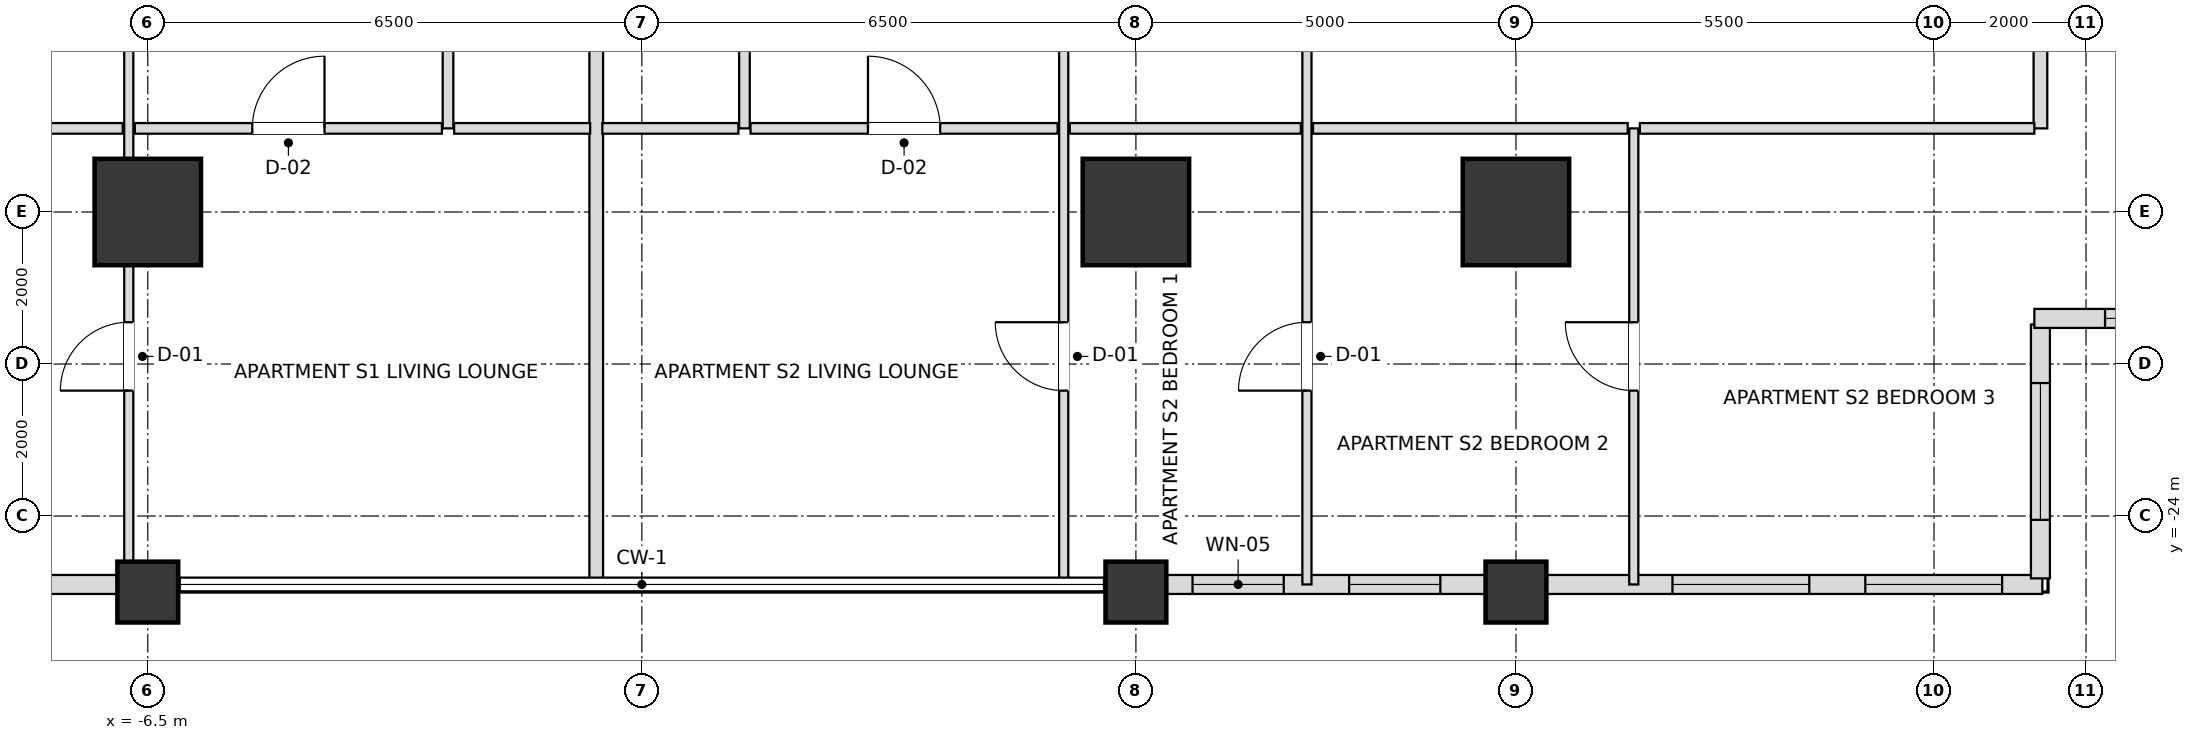
"""IFC4 building model, lengths in metres.
Left out: names, types, materials, properties, quantities, classifications, styles, units other than length and angle.
Written with IfcOpenShell. Run it as: python <this file> out.ifc"""

import sys

from ifc_helpers import new_model, si_unit, direction, frame, frame_2d, origin, origin_2d, place, context, subcontext, project, spatial, rectangle, extrude, element, fill, save


model = new_model("IFC4")
c1 = context("Model", 3, precision=1e-05, world=origin(), true_north=direction((0.0, 1.0)))
c2 = subcontext(c1, "Body", "Model", "MODEL_VIEW")
j1 = project(units=[si_unit("LENGTHUNIT", "METRE"), si_unit("PLANEANGLEUNIT", "RADIAN")], contexts=[c1])
p1 = place(None, origin())
s1 = spatial("IfcSite", under=j1, at=p1, CompositionType="ELEMENT")
p2 = place(p1, origin())
s2 = spatial("IfcBuilding", under=s1, at=p2, CompositionType="ELEMENT")
p3 = place(p2, frame((0.0, 0.0, 75.6)))
s3 = spatial("IfcBuildingStorey", under=s2, at=p3, CompositionType="ELEMENT", Elevation=75.6)
for number, where, z_axis, x_axis in (
    (1, (-6.5, -20.0, 0.0), (0.0, 0.0, 1.0), (1.0, 0.0, 0.0)),
    (2, (6.5, -20.0, 0.0), (0.0, 0.0, 1.0), (1.0, 0.0, 0.0)),
    (3, (11.5, -20.0, 0.0), (0.0, 0.0, 1.0), (1.0, 0.0, 0.0)),
):
    element("IfcColumn", number, at=place(p3, frame(where, z_axis=z_axis, x_axis=x_axis)), inside=s3, PredefinedType="USERDEFINED", context=c2, shape_type="SweptSolid", body=[
        extrude(rectangle(XDim=1.4, YDim=1.4, at=origin_2d()), origin(), (0.0, 0.0, 1.0), 3.6),
    ])
for number, where, z_axis, x_axis in (
    (4, (-6.5, -25.0, 0.0), (0.0, 0.0, 1.0), (1.0, 0.0, 0.0)),
    (5, (6.5, -25.0, 0.0), (0.0, 0.0, 1.0), (1.0, 0.0, 0.0)),
    (6, (11.5, -25.0, 0.0), (0.0, 0.0, 1.0), (1.0, 0.0, 0.0)),
):
    element("IfcColumn", number, at=place(p3, frame(where, z_axis=z_axis, x_axis=x_axis)), inside=s3, PredefinedType="COLUMN", context=c2, shape_type="SweptSolid", body=[
        extrude(rectangle(XDim=0.8, YDim=0.8, at=origin_2d()), origin(), (0.0, 0.0, 1.0), 3.6),
    ])
p4 = place(p3, frame((-11.105, -24.9, 0.0), z_axis=(0.0, 0.0, 1.0), x_axis=(1.0, 0.0, 0.0)))
e7 = element("IfcWall", 7, at=p4, inside=s3, PredefinedType="SOLIDWALL", context=c2, shape_type="SweptSolid", body=[
    extrude(rectangle(XDim=4.21, YDim=0.25, at=frame_2d((2.105, 0.0))), origin(), (0.0, 0.0, 1.0), 2.736),
])
p5 = place(p4, frame((1.205, 0.0, 0.72)))
e8 = element("IfcOpeningElement", 8, at=p5, cuts=e7, PredefinedType="OPENING", context=c2, shape_type="SweptSolid", body=[
    extrude(rectangle(XDim=1.8, YDim=1.68, at=frame_2d((0.9, 0.84))), frame((0.0, 0.135, 0.0), z_axis=(0.0, -1.0, 0.0), x_axis=(1.0, 0.0, 0.0)), (0.0, 0.0, 1.0), 0.27),
])
p6 = place(p3, frame((6.895, -24.9, 0.0), z_axis=(0.0, 0.0, 1.0), x_axis=(1.0, 0.0, 0.0)))
e9 = element("IfcWall", 9, at=p6, inside=s3, PredefinedType="SOLIDWALL", context=c2, shape_type="SweptSolid", body=[
    extrude(rectangle(XDim=4.21, YDim=0.25, at=frame_2d((2.105, 0.0))), origin(), (0.0, 0.0, 1.0), 2.736),
])
p7 = place(p6, frame((0.35, 0.0, 0.72)))
e10 = element("IfcOpeningElement", 10, at=p7, cuts=e9, PredefinedType="OPENING", context=c2, shape_type="SweptSolid", body=[
    extrude(rectangle(XDim=1.2, YDim=1.68, at=frame_2d((0.6, 0.84))), frame((0.0, 0.135, 0.0), z_axis=(0.0, -1.0, 0.0), x_axis=(1.0, 0.0, 0.0)), (0.0, 0.0, 1.0), 0.27),
])
p8 = place(p6, frame((2.41, 0.0, 0.72)))
e11 = element("IfcOpeningElement", 11, at=p8, cuts=e9, PredefinedType="OPENING", context=c2, shape_type="SweptSolid", body=[
    extrude(rectangle(XDim=1.2, YDim=1.68, at=frame_2d((0.6, 0.84))), frame((0.0, 0.135, 0.0), z_axis=(0.0, -1.0, 0.0), x_axis=(1.0, 0.0, 0.0)), (0.0, 0.0, 1.0), 0.27),
])
p9 = place(p3, frame((11.895, -24.9, 0.0), z_axis=(0.0, 0.0, 1.0), x_axis=(1.0, 0.0, 0.0)))
e12 = element("IfcWall", 12, at=p9, inside=s3, PredefinedType="SOLIDWALL", context=c2, shape_type="SweptSolid", body=[
    extrude(rectangle(XDim=6.53, YDim=0.25, at=frame_2d((3.265, 0.0))), origin(), (0.0, 0.0, 1.0), 2.736),
])
p10 = place(p9, frame((1.664, 0.0, 0.72)))
e13 = element("IfcOpeningElement", 13, at=p10, cuts=e12, PredefinedType="OPENING", context=c2, shape_type="SweptSolid", body=[
    extrude(rectangle(XDim=1.8, YDim=1.68, at=frame_2d((0.9, 0.84))), frame((0.0, 0.135, 0.0), z_axis=(0.0, -1.0, 0.0), x_axis=(1.0, 0.0, 0.0)), (0.0, 0.0, 1.0), 0.27),
])
p11 = place(p9, frame((4.201, 0.0, 0.72)))
e14 = element("IfcOpeningElement", 14, at=p11, cuts=e12, PredefinedType="OPENING", context=c2, shape_type="SweptSolid", body=[
    extrude(rectangle(XDim=1.8, YDim=1.68, at=frame_2d((0.9, 0.84))), frame((0.0, 0.135, 0.0), z_axis=(0.0, -1.0, 0.0), x_axis=(1.0, 0.0, 0.0)), (0.0, 0.0, 1.0), 0.27),
])
p12 = place(p3, frame((18.4, -24.82, 0.0), z_axis=(0.0, 0.0, 1.0), x_axis=(0.0, 1.0, 0.0)))
e15 = element("IfcWall", 15, at=p12, inside=s3, PredefinedType="SOLIDWALL", context=c2, shape_type="SweptSolid", body=[
    extrude(rectangle(XDim=3.34, YDim=0.25, at=frame_2d((1.67, 0.0))), origin(), (0.0, 0.0, 1.0), 2.736),
])
p13 = place(p12, frame((0.77, 0.0, 0.72)))
e16 = element("IfcOpeningElement", 16, at=p13, cuts=e15, PredefinedType="OPENING", context=c2, shape_type="SweptSolid", body=[
    extrude(rectangle(XDim=1.8, YDim=1.68, at=frame_2d((0.9, 0.84))), frame((0.0, 0.135, 0.0), z_axis=(0.0, -1.0, 0.0), x_axis=(1.0, 0.0, 0.0)), (0.0, 0.0, 1.0), 0.27),
])
p14 = place(p3, frame((18.32, -21.4, 0.0), z_axis=(0.0, 0.0, 1.0), x_axis=(1.0, 0.0, 0.0)))
e17 = element("IfcWall", 17, at=p14, inside=s3, PredefinedType="SOLIDWALL", context=c2, shape_type="SweptSolid", body=[
    extrude(rectangle(XDim=3.66, YDim=0.25, at=frame_2d((1.83, 0.0))), origin(), (0.0, 0.0, 1.0), 2.736),
])
p15 = place(p14, frame((0.93, 0.0, 0.72)))
e18 = element("IfcOpeningElement", 18, at=p15, cuts=e17, PredefinedType="OPENING", context=c2, shape_type="SweptSolid", body=[
    extrude(rectangle(XDim=1.8, YDim=1.68, at=frame_2d((0.9, 0.84))), frame((0.0, 0.135, 0.0), z_axis=(0.0, -1.0, 0.0), x_axis=(1.0, 0.0, 0.0)), (0.0, 0.0, 1.0), 0.27),
])
p16 = place(p3, frame((-6.75, -24.9, 0.0), z_axis=(0.0, 0.0, 1.0), x_axis=(0.0, 1.0, 0.0)))
e19 = element("IfcWall", 19, at=p16, inside=s3, PredefinedType="PARTITIONING", context=c2, shape_type="SweptSolid", body=[
    extrude(rectangle(XDim=15.6, YDim=0.12, at=frame_2d((7.8, 0.0))), origin(), (0.0, 0.0, 1.0), 2.816),
])
p17 = place(p16, frame((10.325, 0.0, 0.0)))
e20 = element("IfcOpeningElement", 20, at=p17, cuts=e19, PredefinedType="OPENING", context=c2, shape_type="SweptSolid", body=[
    extrude(rectangle(XDim=0.95, YDim=2.1, at=frame_2d((0.475, 1.05))), frame((0.0, 0.07, 0.0), z_axis=(0.0, -1.0, 0.0), x_axis=(1.0, 0.0, 0.0)), (0.0, 0.0, 1.0), 0.14),
])
p18 = place(p16, frame((2.55, 0.0, 0.0)))
e21 = element("IfcOpeningElement", 21, at=p18, cuts=e19, PredefinedType="OPENING", context=c2, shape_type="SweptSolid", body=[
    extrude(rectangle(XDim=0.9, YDim=2.1, at=frame_2d((0.45, 1.05))), frame((0.0, 0.07, 0.0), z_axis=(0.0, -1.0, 0.0), x_axis=(1.0, 0.0, 0.0)), (0.0, 0.0, 1.0), 0.14),
])
p19 = place(p3, frame((-2.55, -18.9, 0.0), z_axis=(0.0, 0.0, 1.0), x_axis=(0.0, 1.0, 0.0)))
e22 = element("IfcWall", 22, at=p19, inside=s3, PredefinedType="PARTITIONING", context=c2, shape_type="SweptSolid", body=[
    extrude(rectangle(XDim=9.6, YDim=0.14, at=frame_2d((4.8, 0.0))), origin(), (0.0, 0.0, 1.0), 2.948),
])
p20 = place(p19, frame((4.35, 0.0, 0.0)))
e23 = element("IfcOpeningElement", 23, at=p20, cuts=e22, PredefinedType="OPENING", context=c2, shape_type="SweptSolid", body=[
    extrude(rectangle(XDim=0.9, YDim=2.1, at=frame_2d((0.45, 1.05))), frame((0.0, 0.08, 0.0), z_axis=(0.0, -1.0, 0.0), x_axis=(1.0, 0.0, 0.0)), (0.0, 0.0, 1.0), 0.16),
])
p21 = place(p3, frame((-0.6, -24.9, 0.0), z_axis=(0.0, 0.0, 1.0), x_axis=(0.0, 1.0, 0.0)))
e24 = element("IfcWall", 24, at=p21, inside=s3, PredefinedType="PARTITIONING", context=c2, shape_type="SweptSolid", body=[
    extrude(rectangle(XDim=15.6, YDim=0.18, at=frame_2d((7.8, 0.0))), origin(), (0.0, 0.0, 1.0), 2.816),
])
p22 = place(p3, frame((1.35, -18.9, 0.0), z_axis=(0.0, 0.0, 1.0), x_axis=(0.0, 1.0, 0.0)))
e25 = element("IfcWall", 25, at=p22, inside=s3, PredefinedType="PARTITIONING", context=c2, shape_type="SweptSolid", body=[
    extrude(rectangle(XDim=9.6, YDim=0.14, at=frame_2d((4.8, 0.0))), origin(), (0.0, 0.0, 1.0), 2.948),
])
p23 = place(p22, frame((4.35, 0.0, 0.0)))
e26 = element("IfcOpeningElement", 26, at=p23, cuts=e25, PredefinedType="OPENING", context=c2, shape_type="SweptSolid", body=[
    extrude(rectangle(XDim=0.9, YDim=2.1, at=frame_2d((0.45, 1.05))), frame((0.0, 0.08, 0.0), z_axis=(0.0, -1.0, 0.0), x_axis=(1.0, 0.0, 0.0)), (0.0, 0.0, 1.0), 0.16),
])
p24 = place(p3, frame((5.55, -24.9, 0.0), z_axis=(0.0, 0.0, 1.0), x_axis=(0.0, 1.0, 0.0)))
e27 = element("IfcWall", 27, at=p24, inside=s3, PredefinedType="PARTITIONING", context=c2, shape_type="SweptSolid", body=[
    extrude(rectangle(XDim=15.6, YDim=0.12, at=frame_2d((7.8, 0.0))), origin(), (0.0, 0.0, 1.0), 2.816),
])
p25 = place(p24, frame((10.325, 0.0, 0.0)))
e28 = element("IfcOpeningElement", 28, at=p25, cuts=e27, PredefinedType="OPENING", context=c2, shape_type="SweptSolid", body=[
    extrude(rectangle(XDim=0.95, YDim=2.1, at=frame_2d((0.475, 1.05))), frame((0.0, 0.07, 0.0), z_axis=(0.0, -1.0, 0.0), x_axis=(1.0, 0.0, 0.0)), (0.0, 0.0, 1.0), 0.14),
])
p26 = place(p24, frame((2.55, 0.0, 0.0)))
e29 = element("IfcOpeningElement", 29, at=p26, cuts=e27, PredefinedType="OPENING", context=c2, shape_type="SweptSolid", body=[
    extrude(rectangle(XDim=0.9, YDim=2.1, at=frame_2d((0.45, 1.05))), frame((0.0, 0.07, 0.0), z_axis=(0.0, -1.0, 0.0), x_axis=(1.0, 0.0, 0.0)), (0.0, 0.0, 1.0), 0.14),
])
p27 = place(p3, frame((8.75, -24.9, 0.0), z_axis=(0.0, 0.0, 1.0), x_axis=(0.0, 1.0, 0.0)))
e30 = element("IfcWall", 30, at=p27, inside=s3, PredefinedType="PARTITIONING", context=c2, shape_type="SweptSolid", body=[
    extrude(rectangle(XDim=15.6, YDim=0.12, at=frame_2d((7.8, 0.0))), origin(), (0.0, 0.0, 1.0), 2.816),
])
p28 = place(p27, frame((10.325, 0.0, 0.0)))
e31 = element("IfcOpeningElement", 31, at=p28, cuts=e30, PredefinedType="OPENING", context=c2, shape_type="SweptSolid", body=[
    extrude(rectangle(XDim=0.95, YDim=2.1, at=frame_2d((0.475, 1.05))), frame((0.0, 0.07, 0.0), z_axis=(0.0, -1.0, 0.0), x_axis=(1.0, 0.0, 0.0)), (0.0, 0.0, 1.0), 0.14),
])
p29 = place(p27, frame((2.55, 0.0, 0.0)))
e32 = element("IfcOpeningElement", 32, at=p29, cuts=e30, PredefinedType="OPENING", context=c2, shape_type="SweptSolid", body=[
    extrude(rectangle(XDim=0.9, YDim=2.1, at=frame_2d((0.45, 1.05))), frame((0.0, 0.07, 0.0), z_axis=(0.0, -1.0, 0.0), x_axis=(1.0, 0.0, 0.0)), (0.0, 0.0, 1.0), 0.14),
])
p30 = place(p3, frame((13.05, -24.9, 0.0), z_axis=(0.0, 0.0, 1.0), x_axis=(0.0, 1.0, 0.0)))
e33 = element("IfcWall", 33, at=p30, inside=s3, PredefinedType="PARTITIONING", context=c2, shape_type="SweptSolid", body=[
    extrude(rectangle(XDim=6.0, YDim=0.12, at=frame_2d((3.0, 0.0))), origin(), (0.0, 0.0, 1.0), 2.736),
])
p31 = place(p30, frame((2.55, 0.0, 0.0)))
e34 = element("IfcOpeningElement", 34, at=p31, cuts=e33, PredefinedType="OPENING", context=c2, shape_type="SweptSolid", body=[
    extrude(rectangle(XDim=0.9, YDim=2.1, at=frame_2d((0.45, 1.05))), frame((0.0, 0.07, 0.0), z_axis=(0.0, -1.0, 0.0), x_axis=(1.0, 0.0, 0.0)), (0.0, 0.0, 1.0), 0.14),
])
p32 = place(p3, frame((18.4, -18.9, 0.0), z_axis=(0.0, 0.0, 1.0), x_axis=(0.0, 1.0, 0.0)))
e35 = element("IfcWall", 35, at=p32, inside=s3, PredefinedType="PARTITIONING", context=c2, shape_type="SweptSolid", body=[
    extrude(rectangle(XDim=9.6, YDim=0.18, at=frame_2d((4.8, 0.0))), origin(), (0.0, 0.0, 1.0), 2.736),
])
p33 = place(p3, frame((-9.87, -18.9, 0.0), z_axis=(0.0, 0.0, 1.0), x_axis=(1.0, 0.0, 0.0)))
e36 = element("IfcWall", 36, at=p33, inside=s3, PredefinedType="PARTITIONING", context=c2, shape_type="SweptSolid", body=[
    extrude(rectangle(XDim=3.04, YDim=0.14, at=frame_2d((1.52, 0.0))), origin(), (0.0, 0.0, 1.0), 3.38),
])
p34 = place(p3, frame((-6.67, -18.9, 0.0), z_axis=(0.0, 0.0, 1.0), x_axis=(1.0, 0.0, 0.0)))
e37 = element("IfcWall", 37, at=p34, inside=s3, PredefinedType="PARTITIONING", context=c2, shape_type="SweptSolid", body=[
    extrude(rectangle(XDim=4.04, YDim=0.14, at=frame_2d((2.02, 0.0))), origin(), (0.0, 0.0, 1.0), 2.816),
])
p35 = place(p34, frame((1.545, 0.0, 0.0)))
e38 = element("IfcOpeningElement", 38, at=p35, cuts=e37, PredefinedType="OPENING", context=c2, shape_type="SweptSolid", body=[
    extrude(rectangle(XDim=0.95, YDim=2.1, at=frame_2d((0.475, 1.05))), frame((0.0, 0.08, 0.0), z_axis=(0.0, -1.0, 0.0), x_axis=(1.0, 0.0, 0.0)), (0.0, 0.0, 1.0), 0.16),
])
for number, where, z_axis, x_axis in (
    (39, (-2.47, -18.9, 0.0), (0.0, 0.0, 1.0), (1.0, 0.0, 0.0)),
    (40, (-0.52, -18.9, 0.0), (0.0, 0.0, 1.0), (1.0, 0.0, 0.0)),
):
    element("IfcWall", number, at=place(p3, frame(where, z_axis=z_axis, x_axis=x_axis)), inside=s3, PredefinedType="PARTITIONING", context=c2, shape_type="SweptSolid", body=[
        extrude(rectangle(XDim=1.79, YDim=0.14, at=frame_2d((0.895, 0.0))), origin(), (0.0, 0.0, 1.0), 3.38),
    ])
p36 = place(p3, frame((1.43, -18.9, 0.0), z_axis=(0.0, 0.0, 1.0), x_axis=(1.0, 0.0, 0.0)))
e41 = element("IfcWall", 41, at=p36, inside=s3, PredefinedType="PARTITIONING", context=c2, shape_type="SweptSolid", body=[
    extrude(rectangle(XDim=4.04, YDim=0.14, at=frame_2d((2.02, 0.0))), origin(), (0.0, 0.0, 1.0), 3.38),
])
p37 = place(p36, frame((1.545, 0.0, 0.0)))
e42 = element("IfcOpeningElement", 42, at=p37, cuts=e41, PredefinedType="OPENING", context=c2, shape_type="SweptSolid", body=[
    extrude(rectangle(XDim=0.95, YDim=2.1, at=frame_2d((0.475, 1.05))), frame((0.0, 0.08, 0.0), z_axis=(0.0, -1.0, 0.0), x_axis=(1.0, 0.0, 0.0)), (0.0, 0.0, 1.0), 0.16),
])
p38 = place(p3, frame((5.63, -18.9, 0.0), z_axis=(0.0, 0.0, 1.0), x_axis=(1.0, 0.0, 0.0)))
e43 = element("IfcWall", 43, at=p38, inside=s3, PredefinedType="PARTITIONING", context=c2, shape_type="SweptSolid", body=[
    extrude(rectangle(XDim=3.04, YDim=0.14, at=frame_2d((1.52, 0.0))), origin(), (0.0, 0.0, 1.0), 2.816),
])
p39 = place(p3, frame((8.83, -18.9, 0.0), z_axis=(0.0, 0.0, 1.0), x_axis=(1.0, 0.0, 0.0)))
e44 = element("IfcWall", 44, at=p39, inside=s3, PredefinedType="PARTITIONING", context=c2, shape_type="SweptSolid", body=[
    extrude(rectangle(XDim=4.14, YDim=0.14, at=frame_2d((2.07, 0.0))), origin(), (0.0, 0.0, 1.0), 2.736),
])
p40 = place(p3, frame((13.13, -18.9, 0.0), z_axis=(0.0, 0.0, 1.0), x_axis=(1.0, 0.0, 0.0)))
e45 = element("IfcWall", 45, at=p40, inside=s3, PredefinedType="PARTITIONING", context=c2, shape_type="SweptSolid", body=[
    extrude(rectangle(XDim=5.19, YDim=0.14, at=frame_2d((2.595, 0.0))), origin(), (0.0, 0.0, 1.0), 2.736),
])
p41 = place(p7, origin())
e46 = element("IfcWindow", 46, at=p41, inside=s3, PartitioningType="SINGLE_PANEL", PredefinedType="WINDOW", context=c2, shape_type="SweptSolid", body=[
    extrude(rectangle(XDim=1.2, YDim=1.68, at=frame_2d((0.6, 0.84))), frame((0.0, 0.03, 0.0), z_axis=(0.0, -1.0, 0.0), x_axis=(1.0, 0.0, 0.0)), (0.0, 0.0, 1.0), 0.06),
])
fill(e10, e46)
p42 = place(p8, origin())
e47 = element("IfcWindow", 47, at=p42, inside=s3, PartitioningType="SINGLE_PANEL", PredefinedType="WINDOW", context=c2, shape_type="SweptSolid", body=[
    extrude(rectangle(XDim=1.2, YDim=1.68, at=frame_2d((0.6, 0.84))), frame((0.0, 0.03, 0.0), z_axis=(0.0, -1.0, 0.0), x_axis=(1.0, 0.0, 0.0)), (0.0, 0.0, 1.0), 0.06),
])
fill(e11, e47)
p43 = place(p10, origin())
e48 = element("IfcWindow", 48, at=p43, inside=s3, PartitioningType="SINGLE_PANEL", PredefinedType="WINDOW", context=c2, shape_type="SweptSolid", body=[
    extrude(rectangle(XDim=1.8, YDim=1.68, at=frame_2d((0.9, 0.84))), frame((0.0, 0.03, 0.0), z_axis=(0.0, -1.0, 0.0), x_axis=(1.0, 0.0, 0.0)), (0.0, 0.0, 1.0), 0.06),
])
fill(e13, e48)
p44 = place(p11, origin())
e49 = element("IfcWindow", 49, at=p44, inside=s3, PartitioningType="SINGLE_PANEL", PredefinedType="WINDOW", context=c2, shape_type="SweptSolid", body=[
    extrude(rectangle(XDim=1.8, YDim=1.68, at=frame_2d((0.9, 0.84))), frame((0.0, 0.03, 0.0), z_axis=(0.0, -1.0, 0.0), x_axis=(1.0, 0.0, 0.0)), (0.0, 0.0, 1.0), 0.06),
])
fill(e14, e49)
p45 = place(p13, origin())
e50 = element("IfcWindow", 50, at=p45, inside=s3, PartitioningType="SINGLE_PANEL", PredefinedType="WINDOW", context=c2, shape_type="SweptSolid", body=[
    extrude(rectangle(XDim=1.8, YDim=1.68, at=frame_2d((0.9, 0.84))), frame((0.0, 0.03, 0.0), z_axis=(0.0, -1.0, 0.0), x_axis=(1.0, 0.0, 0.0)), (0.0, 0.0, 1.0), 0.06),
])
fill(e16, e50)
p46 = place(p15, origin())
e51 = element("IfcWindow", 51, at=p46, inside=s3, PartitioningType="SINGLE_PANEL", PredefinedType="WINDOW", context=c2, shape_type="SweptSolid", body=[
    extrude(rectangle(XDim=1.8, YDim=1.68, at=frame_2d((0.9, 0.84))), frame((0.0, 0.03, 0.0), z_axis=(0.0, -1.0, 0.0), x_axis=(1.0, 0.0, 0.0)), (0.0, 0.0, 1.0), 0.06),
])
fill(e18, e51)
p47 = place(p35, origin())
e52 = element("IfcDoor", 52, at=p47, inside=s3, OperationType="SINGLE_SWING_RIGHT", PredefinedType="DOOR", context=c2, shape_type="SweptSolid", body=[
    extrude(rectangle(XDim=0.95, YDim=2.1, at=frame_2d((0.475, 1.05))), frame((0.0, 0.025, 0.0), z_axis=(0.0, -1.0, 0.0), x_axis=(1.0, 0.0, 0.0)), (0.0, 0.0, 1.0), 0.05),
])
fill(e38, e52)
p48 = place(p18, origin())
e53 = element("IfcDoor", 53, at=p48, inside=s3, OperationType="SINGLE_SWING_LEFT", PredefinedType="DOOR", context=c2, shape_type="SweptSolid", body=[
    extrude(rectangle(XDim=0.9, YDim=2.1, at=frame_2d((0.45, 1.05))), frame((0.0, 0.025, 0.0), z_axis=(0.0, -1.0, 0.0), x_axis=(1.0, 0.0, 0.0)), (0.0, 0.0, 1.0), 0.05),
])
fill(e21, e53)
p49 = place(p37, origin())
e54 = element("IfcDoor", 54, at=p49, inside=s3, OperationType="SINGLE_SWING_LEFT", PredefinedType="DOOR", context=c2, shape_type="SweptSolid", body=[
    extrude(rectangle(XDim=0.95, YDim=2.1, at=frame_2d((0.475, 1.05))), frame((0.0, 0.025, 0.0), z_axis=(0.0, -1.0, 0.0), x_axis=(1.0, 0.0, 0.0)), (0.0, 0.0, 1.0), 0.05),
])
fill(e42, e54)
p50 = place(p26, origin())
e55 = element("IfcDoor", 55, at=p50, inside=s3, OperationType="SINGLE_SWING_RIGHT", PredefinedType="DOOR", context=c2, shape_type="SweptSolid", body=[
    extrude(rectangle(XDim=0.9, YDim=2.1, at=frame_2d((0.45, 1.05))), frame((0.0, 0.025, 0.0), z_axis=(0.0, -1.0, 0.0), x_axis=(1.0, 0.0, 0.0)), (0.0, 0.0, 1.0), 0.05),
])
fill(e29, e55)
p51 = place(p29, origin())
e56 = element("IfcDoor", 56, at=p51, inside=s3, OperationType="SINGLE_SWING_LEFT", PredefinedType="DOOR", context=c2, shape_type="SweptSolid", body=[
    extrude(rectangle(XDim=0.9, YDim=2.1, at=frame_2d((0.45, 1.05))), frame((0.0, 0.025, 0.0), z_axis=(0.0, -1.0, 0.0), x_axis=(1.0, 0.0, 0.0)), (0.0, 0.0, 1.0), 0.05),
])
fill(e32, e56)
p52 = place(p31, origin())
e57 = element("IfcDoor", 57, at=p52, inside=s3, OperationType="SINGLE_SWING_RIGHT", PredefinedType="DOOR", context=c2, shape_type="SweptSolid", body=[
    extrude(rectangle(XDim=0.9, YDim=2.1, at=frame_2d((0.45, 1.05))), frame((0.0, 0.025, 0.0), z_axis=(0.0, -1.0, 0.0), x_axis=(1.0, 0.0, 0.0)), (0.0, 0.0, 1.0), 0.05),
])
fill(e34, e57)
save(model, sys.argv[1])
